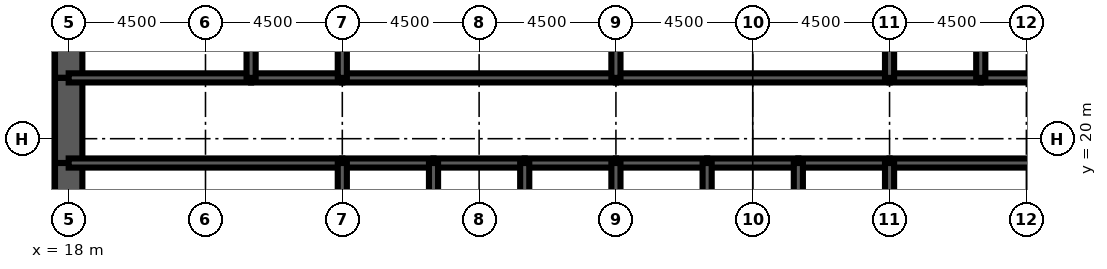
"""IFC4 building model, lengths in metres.
Left out: names, types, materials, properties, quantities, classifications, styles, units other than length and angle.
Written with IfcOpenShell. Run it as: python <this file> out.ifc"""

import sys

from ifc_helpers import new_model, si_unit, direction, frame, frame_2d, origin, place, context, subcontext, project, spatial, rectangle, extrude, element, fill, save


model = new_model("IFC4")
c1 = context("Model", 3, precision=1e-05, world=origin(), true_north=direction((0.0, 1.0)))
c2 = subcontext(c1, "Body", "Model", "MODEL_VIEW")
j1 = project(units=[si_unit("LENGTHUNIT", "METRE"), si_unit("PLANEANGLEUNIT", "RADIAN")], contexts=[c1])
p1 = place(None, origin())
s1 = spatial("IfcSite", under=j1, at=p1, CompositionType="ELEMENT")
p2 = place(p1, origin())
s2 = spatial("IfcBuilding", under=s1, at=p2, CompositionType="ELEMENT")
p3 = place(p2, frame((0.0, 0.0, 163.5)))
s3 = spatial("IfcBuildingStorey", under=s2, at=p3, CompositionType="ELEMENT", Elevation=163.5)
p4 = place(p3, frame((18.0, 26.0, 0.0), z_axis=(0.0, 0.0, 1.0), x_axis=(0.0, -1.0, 0.0)))
e1 = element("IfcWall", 1, at=p4, inside=s3, PredefinedType="SHEAR", context=c2, shape_type="SweptSolid", body=[
    extrude(rectangle(XDim=4.0, YDim=0.9, at=frame_2d((2.0, 0.0))), origin(), (0.0, 0.0, 1.0), 4.2),
])
p5 = place(p3, frame((18.0, 22.0, 0.0), z_axis=(0.0, 0.0, 1.0), x_axis=(0.0, -1.0, 0.0)))
e2 = element("IfcWall", 2, at=p5, inside=s3, PredefinedType="SHEAR", context=c2, shape_type="SweptSolid", body=[
    extrude(rectangle(XDim=2.8, YDim=0.9, at=frame_2d((1.4, 0.0))), origin(), (0.0, 0.0, 1.0), 4.2),
])
p6 = place(p5, frame((0.6, 0.0, 0.0)))
e3 = element("IfcOpeningElement", 3, at=p6, cuts=e2, PredefinedType="OPENING", context=c2, shape_type="SweptSolid", body=[
    extrude(rectangle(XDim=1.8, YDim=2.1, at=frame_2d((0.9, 1.05))), frame((0.0, 0.46, 0.0), z_axis=(0.0, -1.0, 0.0), x_axis=(1.0, 0.0, 0.0)), (0.0, 0.0, 1.0), 0.92),
])
p7 = place(p3, frame((18.0, 19.2, 0.0), z_axis=(0.0, 0.0, 1.0), x_axis=(0.0, -1.0, 0.0)))
e4 = element("IfcWall", 4, at=p7, inside=s3, PredefinedType="SHEAR", context=c2, shape_type="SweptSolid", body=[
    extrude(rectangle(XDim=3.2, YDim=0.9, at=frame_2d((1.6, 0.0))), origin(), (0.0, 0.0, 1.0), 4.2),
])
p8 = place(p3, frame((18.0, 19.2, 0.0), z_axis=(0.0, 0.0, 1.0), x_axis=(1.0, 0.0, 0.0)))
e5 = element("IfcWall", 5, at=p8, inside=s3, PredefinedType="SOLIDWALL", context=c2, shape_type="SweptSolid", body=[
    extrude(rectangle(XDim=9.0, YDim=0.3, at=frame_2d((4.5, 0.0))), origin(), (0.0, 0.0, 1.0), 4.2),
])
p9 = place(p8, frame((0.65, 0.0, 0.0)))
e6 = element("IfcOpeningElement", 6, at=p9, cuts=e5, PredefinedType="OPENING", context=c2, shape_type="SweptSolid", body=[
    extrude(rectangle(XDim=1.0, YDim=2.1, at=frame_2d((0.5, 1.05))), frame((0.0, 0.16, 0.0), z_axis=(0.0, -1.0, 0.0), x_axis=(1.0, 0.0, 0.0)), (0.0, 0.0, 1.0), 0.32),
])
p10 = place(p3, frame((27.0, 19.2, 0.0), z_axis=(0.0, 0.0, 1.0), x_axis=(1.0, 0.0, 0.0)))
e7 = element("IfcWall", 7, at=p10, inside=s3, PredefinedType="SOLIDWALL", context=c2, shape_type="SweptSolid", body=[
    extrude(rectangle(XDim=3.0, YDim=0.3, at=frame_2d((1.5, 0.0))), origin(), (0.0, 0.0, 1.0), 4.2),
])
p11 = place(p10, frame((0.95, 0.0, 0.0)))
e8 = element("IfcOpeningElement", 8, at=p11, cuts=e7, PredefinedType="OPENING", context=c2, shape_type="SweptSolid", body=[
    extrude(rectangle(XDim=1.1, YDim=2.2, at=frame_2d((0.55, 1.1))), frame((0.0, 0.16, 0.0), z_axis=(0.0, -1.0, 0.0), x_axis=(1.0, 0.0, 0.0)), (0.0, 0.0, 1.0), 0.32),
])
p12 = place(p3, frame((30.0, 19.2, 0.0), z_axis=(0.0, 0.0, 1.0), x_axis=(1.0, 0.0, 0.0)))
e9 = element("IfcWall", 9, at=p12, inside=s3, PredefinedType="SOLIDWALL", context=c2, shape_type="SweptSolid", body=[
    extrude(rectangle(XDim=3.0, YDim=0.3, at=frame_2d((1.5, 0.0))), origin(), (0.0, 0.0, 1.0), 4.2),
])
p13 = place(p12, frame((0.95, 0.0, 0.0)))
e10 = element("IfcOpeningElement", 10, at=p13, cuts=e9, PredefinedType="OPENING", context=c2, shape_type="SweptSolid", body=[
    extrude(rectangle(XDim=1.1, YDim=2.2, at=frame_2d((0.55, 1.1))), frame((0.0, 0.16, 0.0), z_axis=(0.0, -1.0, 0.0), x_axis=(1.0, 0.0, 0.0)), (0.0, 0.0, 1.0), 0.32),
])
p14 = place(p3, frame((33.0, 19.2, 0.0), z_axis=(0.0, 0.0, 1.0), x_axis=(1.0, 0.0, 0.0)))
e11 = element("IfcWall", 11, at=p14, inside=s3, PredefinedType="SOLIDWALL", context=c2, shape_type="SweptSolid", body=[
    extrude(rectangle(XDim=3.0, YDim=0.3, at=frame_2d((1.5, 0.0))), origin(), (0.0, 0.0, 1.0), 4.2),
])
p15 = place(p14, frame((0.95, 0.0, 0.0)))
e12 = element("IfcOpeningElement", 12, at=p15, cuts=e11, PredefinedType="OPENING", context=c2, shape_type="SweptSolid", body=[
    extrude(rectangle(XDim=1.1, YDim=2.2, at=frame_2d((0.55, 1.1))), frame((0.0, 0.16, 0.0), z_axis=(0.0, -1.0, 0.0), x_axis=(1.0, 0.0, 0.0)), (0.0, 0.0, 1.0), 0.32),
])
p16 = place(p3, frame((36.0, 19.2, 0.0), z_axis=(0.0, 0.0, 1.0), x_axis=(1.0, 0.0, 0.0)))
e13 = element("IfcWall", 13, at=p16, inside=s3, PredefinedType="SOLIDWALL", context=c2, shape_type="SweptSolid", body=[
    extrude(rectangle(XDim=3.0, YDim=0.3, at=frame_2d((1.5, 0.0))), origin(), (0.0, 0.0, 1.0), 4.2),
])
p17 = place(p16, frame((0.95, 0.0, 0.0)))
e14 = element("IfcOpeningElement", 14, at=p17, cuts=e13, PredefinedType="OPENING", context=c2, shape_type="SweptSolid", body=[
    extrude(rectangle(XDim=1.1, YDim=2.2, at=frame_2d((0.55, 1.1))), frame((0.0, 0.16, 0.0), z_axis=(0.0, -1.0, 0.0), x_axis=(1.0, 0.0, 0.0)), (0.0, 0.0, 1.0), 0.32),
])
p18 = place(p3, frame((39.0, 19.2, 0.0), z_axis=(0.0, 0.0, 1.0), x_axis=(1.0, 0.0, 0.0)))
e15 = element("IfcWall", 15, at=p18, inside=s3, PredefinedType="SOLIDWALL", context=c2, shape_type="SweptSolid", body=[
    extrude(rectangle(XDim=3.0, YDim=0.3, at=frame_2d((1.5, 0.0))), origin(), (0.0, 0.0, 1.0), 4.2),
])
p19 = place(p18, frame((1.0, 0.0, 0.0)))
e16 = element("IfcOpeningElement", 16, at=p19, cuts=e15, PredefinedType="OPENING", context=c2, shape_type="SweptSolid", body=[
    extrude(rectangle(XDim=1.0, YDim=2.1, at=frame_2d((0.5, 1.05))), frame((0.0, 0.16, 0.0), z_axis=(0.0, -1.0, 0.0), x_axis=(1.0, 0.0, 0.0)), (0.0, 0.0, 1.0), 0.32),
])
p20 = place(p3, frame((42.0, 19.2, 0.0), z_axis=(0.0, 0.0, 1.0), x_axis=(1.0, 0.0, 0.0)))
e17 = element("IfcWall", 17, at=p20, inside=s3, PredefinedType="SOLIDWALL", context=c2, shape_type="SweptSolid", body=[
    extrude(rectangle(XDim=3.0, YDim=0.3, at=frame_2d((1.5, 0.0))), origin(), (0.0, 0.0, 1.0), 4.2),
])
p21 = place(p3, frame((45.0, 19.2, 0.0), z_axis=(0.0, 0.0, 1.0), x_axis=(1.0, 0.0, 0.0)))
e18 = element("IfcWall", 18, at=p21, inside=s3, PredefinedType="SOLIDWALL", context=c2, shape_type="SweptSolid", body=[
    extrude(rectangle(XDim=9.0, YDim=0.3, at=frame_2d((4.5, 0.0))), origin(), (0.0, 0.0, 1.0), 4.2),
])
p22 = place(p21, frame((7.35, 0.0, 0.0)))
e19 = element("IfcOpeningElement", 19, at=p22, cuts=e18, PredefinedType="OPENING", context=c2, shape_type="SweptSolid", body=[
    extrude(rectangle(XDim=1.0, YDim=2.1, at=frame_2d((0.5, 1.05))), frame((0.0, 0.16, 0.0), z_axis=(0.0, -1.0, 0.0), x_axis=(1.0, 0.0, 0.0)), (0.0, 0.0, 1.0), 0.32),
])
p23 = place(p3, frame((18.0, 22.0, 0.0), z_axis=(0.0, 0.0, 1.0), x_axis=(1.0, 0.0, 0.0)))
e20 = element("IfcWall", 20, at=p23, inside=s3, PredefinedType="SOLIDWALL", context=c2, shape_type="SweptSolid", body=[
    extrude(rectangle(XDim=6.0, YDim=0.3, at=frame_2d((3.0, 0.0))), origin(), (0.0, 0.0, 1.0), 4.2),
])
p24 = place(p23, frame((4.4, 0.0, 0.0)))
e21 = element("IfcOpeningElement", 21, at=p24, cuts=e20, PredefinedType="OPENING", context=c2, shape_type="SweptSolid", body=[
    extrude(rectangle(XDim=1.0, YDim=2.1, at=frame_2d((0.5, 1.05))), frame((0.0, 0.16, 0.0), z_axis=(0.0, -1.0, 0.0), x_axis=(1.0, 0.0, 0.0)), (0.0, 0.0, 1.0), 0.32),
])
p25 = place(p23, frame((0.85, 0.0, 0.0)))
e22 = element("IfcOpeningElement", 22, at=p25, cuts=e20, PredefinedType="OPENING", context=c2, shape_type="SweptSolid", body=[
    extrude(rectangle(XDim=1.0, YDim=2.1, at=frame_2d((0.5, 1.05))), frame((0.0, 0.16, 0.0), z_axis=(0.0, -1.0, 0.0), x_axis=(1.0, 0.0, 0.0)), (0.0, 0.0, 1.0), 0.32),
])
p26 = place(p3, frame((24.0, 22.0, 0.0), z_axis=(0.0, 0.0, 1.0), x_axis=(1.0, 0.0, 0.0)))
e23 = element("IfcWall", 23, at=p26, inside=s3, PredefinedType="SOLIDWALL", context=c2, shape_type="SweptSolid", body=[
    extrude(rectangle(XDim=3.0, YDim=0.3, at=frame_2d((1.5, 0.0))), origin(), (0.0, 0.0, 1.0), 4.2),
])
p27 = place(p26, frame((1.0, 0.0, 0.0)))
e24 = element("IfcOpeningElement", 24, at=p27, cuts=e23, PredefinedType="OPENING", context=c2, shape_type="SweptSolid", body=[
    extrude(rectangle(XDim=1.0, YDim=2.1, at=frame_2d((0.5, 1.05))), frame((0.0, 0.16, 0.0), z_axis=(0.0, -1.0, 0.0), x_axis=(1.0, 0.0, 0.0)), (0.0, 0.0, 1.0), 0.32),
])
p28 = place(p3, frame((27.0, 22.0, 0.0), z_axis=(0.0, 0.0, 1.0), x_axis=(1.0, 0.0, 0.0)))
e25 = element("IfcWall", 25, at=p28, inside=s3, PredefinedType="SOLIDWALL", context=c2, shape_type="SweptSolid", body=[
    extrude(rectangle(XDim=9.0, YDim=0.3, at=frame_2d((4.5, 0.0))), origin(), (0.0, 0.0, 1.0), 4.2),
])
p29 = place(p28, frame((4.0, 0.0, 0.0)))
e26 = element("IfcOpeningElement", 26, at=p29, cuts=e25, PredefinedType="OPENING", context=c2, shape_type="SweptSolid", body=[
    extrude(rectangle(XDim=1.0, YDim=2.1, at=frame_2d((0.5, 1.05))), frame((0.0, 0.16, 0.0), z_axis=(0.0, -1.0, 0.0), x_axis=(1.0, 0.0, 0.0)), (0.0, 0.0, 1.0), 0.32),
])
p30 = place(p3, frame((36.0, 22.0, 0.0), z_axis=(0.0, 0.0, 1.0), x_axis=(1.0, 0.0, 0.0)))
e27 = element("IfcWall", 27, at=p30, inside=s3, PredefinedType="SOLIDWALL", context=c2, shape_type="SweptSolid", body=[
    extrude(rectangle(XDim=9.0, YDim=0.3, at=frame_2d((4.5, 0.0))), origin(), (0.0, 0.0, 1.0), 4.2),
])
p31 = place(p30, frame((4.0, 0.0, 0.0)))
e28 = element("IfcOpeningElement", 28, at=p31, cuts=e27, PredefinedType="OPENING", context=c2, shape_type="SweptSolid", body=[
    extrude(rectangle(XDim=1.0, YDim=2.1, at=frame_2d((0.5, 1.05))), frame((0.0, 0.16, 0.0), z_axis=(0.0, -1.0, 0.0), x_axis=(1.0, 0.0, 0.0)), (0.0, 0.0, 1.0), 0.32),
])
p32 = place(p3, frame((45.0, 22.0, 0.0), z_axis=(0.0, 0.0, 1.0), x_axis=(1.0, 0.0, 0.0)))
e29 = element("IfcWall", 29, at=p32, inside=s3, PredefinedType="SOLIDWALL", context=c2, shape_type="SweptSolid", body=[
    extrude(rectangle(XDim=3.0, YDim=0.3, at=frame_2d((1.5, 0.0))), origin(), (0.0, 0.0, 1.0), 4.2),
])
p33 = place(p32, frame((1.0, 0.0, 0.0)))
e30 = element("IfcOpeningElement", 30, at=p33, cuts=e29, PredefinedType="OPENING", context=c2, shape_type="SweptSolid", body=[
    extrude(rectangle(XDim=1.0, YDim=2.1, at=frame_2d((0.5, 1.05))), frame((0.0, 0.16, 0.0), z_axis=(0.0, -1.0, 0.0), x_axis=(1.0, 0.0, 0.0)), (0.0, 0.0, 1.0), 0.32),
])
p34 = place(p3, frame((48.0, 22.0, 0.0), z_axis=(0.0, 0.0, 1.0), x_axis=(1.0, 0.0, 0.0)))
e31 = element("IfcWall", 31, at=p34, inside=s3, PredefinedType="SOLIDWALL", context=c2, shape_type="SweptSolid", body=[
    extrude(rectangle(XDim=6.0, YDim=0.3, at=frame_2d((3.0, 0.0))), origin(), (0.0, 0.0, 1.0), 4.2),
])
p35 = place(p34, frame((2.0, 0.0, 0.0)))
e32 = element("IfcOpeningElement", 32, at=p35, cuts=e31, PredefinedType="OPENING", context=c2, shape_type="SweptSolid", body=[
    extrude(rectangle(XDim=1.0, YDim=2.1, at=frame_2d((0.5, 1.05))), frame((0.0, 0.16, 0.0), z_axis=(0.0, -1.0, 0.0), x_axis=(1.0, 0.0, 0.0)), (0.0, 0.0, 1.0), 0.32),
])
p36 = place(p34, frame((4.3, 0.0, 0.0)))
e33 = element("IfcOpeningElement", 33, at=p36, cuts=e31, PredefinedType="OPENING", context=c2, shape_type="SweptSolid", body=[
    extrude(rectangle(XDim=1.0, YDim=2.1, at=frame_2d((0.5, 1.05))), frame((0.0, 0.16, 0.0), z_axis=(0.0, -1.0, 0.0), x_axis=(1.0, 0.0, 0.0)), (0.0, 0.0, 1.0), 0.32),
])
for number, where, z_axis, x_axis in (
    (34, (27.0, 16.0, 0.0), (0.0, 0.0, 1.0), (0.0, 1.0, 0.0)),
    (35, (30.0, 16.0, 0.0), (0.0, 0.0, 1.0), (0.0, 1.0, 0.0)),
    (36, (33.0, 16.0, 0.0), (0.0, 0.0, 1.0), (0.0, 1.0, 0.0)),
    (37, (36.0, 16.0, 0.0), (0.0, 0.0, 1.0), (0.0, 1.0, 0.0)),
    (38, (39.0, 16.0, 0.0), (0.0, 0.0, 1.0), (0.0, 1.0, 0.0)),
    (39, (42.0, 16.0, 0.0), (0.0, 0.0, 1.0), (0.0, 1.0, 0.0)),
    (40, (45.0, 16.0, 0.0), (0.0, 0.0, 1.0), (0.0, 1.0, 0.0)),
):
    element("IfcWall", number, at=place(p3, frame(where, z_axis=z_axis, x_axis=x_axis)), inside=s3, PredefinedType="SOLIDWALL", context=c2, shape_type="SweptSolid", body=[
        extrude(rectangle(XDim=3.2, YDim=0.3, at=frame_2d((1.6, 0.0))), origin(), (0.0, 0.0, 1.0), 4.2),
    ])
for number, where, z_axis, x_axis in (
    (41, (24.0, 22.0, 0.0), (0.0, 0.0, 1.0), (0.0, 1.0, 0.0)),
    (42, (27.0, 22.0, 0.0), (0.0, 0.0, 1.0), (0.0, 1.0, 0.0)),
    (43, (36.0, 22.0, 0.0), (0.0, 0.0, 1.0), (0.0, 1.0, 0.0)),
    (44, (45.0, 22.0, 0.0), (0.0, 0.0, 1.0), (0.0, 1.0, 0.0)),
    (45, (48.0, 22.0, 0.0), (0.0, 0.0, 1.0), (0.0, 1.0, 0.0)),
):
    element("IfcWall", number, at=place(p3, frame(where, z_axis=z_axis, x_axis=x_axis)), inside=s3, PredefinedType="SOLIDWALL", context=c2, shape_type="SweptSolid", body=[
        extrude(rectangle(XDim=4.0, YDim=0.3, at=frame_2d((2.0, 0.0))), origin(), (0.0, 0.0, 1.0), 4.2),
    ])
p37 = place(p3, frame((39.0, 22.15, 0.0), z_axis=(0.0, 0.0, 1.0), x_axis=(0.0, 1.0, 0.0)))
e46 = element("IfcWall", 46, at=p37, inside=s3, PredefinedType="PARTITIONING", context=c2, shape_type="SweptSolid", body=[
    extrude(rectangle(XDim=3.7, YDim=0.15, at=frame_2d((1.85, 0.0))), origin(), (0.0, 0.0, 1.0), 3.0),
])
p38 = place(p37, frame((2.2, 0.0, 0.0)))
e47 = element("IfcOpeningElement", 47, at=p38, cuts=e46, PredefinedType="OPENING", context=c2, shape_type="SweptSolid", body=[
    extrude(rectangle(XDim=1.0, YDim=2.1, at=frame_2d((0.5, 1.05))), frame((0.0, 0.085, 0.0), z_axis=(0.0, -1.0, 0.0), x_axis=(1.0, 0.0, 0.0)), (0.0, 0.0, 1.0), 0.17),
])
p39 = place(p3, frame((20.325, 22.15, 0.0), z_axis=(0.0, 0.0, 1.0), x_axis=(0.0, 1.0, 0.0)))
e48 = element("IfcWall", 48, at=p39, inside=s3, PredefinedType="PARTITIONING", context=c2, shape_type="SweptSolid", body=[
    extrude(rectangle(XDim=3.7, YDim=0.15, at=frame_2d((1.85, 0.0))), origin(), (0.0, 0.0, 1.0), 3.0),
])
p40 = place(p3, frame((48.6, 19.35, 0.0), z_axis=(0.0, 0.0, 1.0), x_axis=(0.0, 1.0, 0.0)))
e49 = element("IfcWall", 49, at=p40, inside=s3, PredefinedType="PARTITIONING", context=c2, shape_type="SweptSolid", body=[
    extrude(rectangle(XDim=2.5, YDim=0.15, at=frame_2d((1.25, 0.0))), origin(), (0.0, 0.0, 1.0), 3.0),
])
p41 = place(p40, frame((1.15, 0.0, 0.0)))
e50 = element("IfcOpeningElement", 50, at=p41, cuts=e49, PredefinedType="OPENING", context=c2, shape_type="SweptSolid", body=[
    extrude(rectangle(XDim=1.0, YDim=2.1, at=frame_2d((0.5, 1.05))), frame((0.0, 0.085, 0.0), z_axis=(0.0, -1.0, 0.0), x_axis=(1.0, 0.0, 0.0)), (0.0, 0.0, 1.0), 0.17),
])
p42 = place(p41, origin())
e51 = element("IfcDoor", 51, at=p42, inside=s3, OperationType="SINGLE_SWING_RIGHT", PredefinedType="DOOR", context=c2, shape_type="SweptSolid", body=[
    extrude(rectangle(XDim=1.0, YDim=2.1, at=frame_2d((0.5, 1.05))), frame((0.0, 0.025, 0.0), z_axis=(0.0, -1.0, 0.0), x_axis=(1.0, 0.0, 0.0)), (0.0, 0.0, 1.0), 0.05),
])
fill(e50, e51)
p43 = place(p11, origin())
e52 = element("IfcDoor", 52, at=p43, inside=s3, OperationType="DOUBLE_DOOR_SLIDING", PredefinedType="USERDEFINED", context=c2, shape_type="SweptSolid", body=[
    extrude(rectangle(XDim=1.1, YDim=2.2, at=frame_2d((0.55, 1.1))), frame((0.0, 0.025, 0.0), z_axis=(0.0, -1.0, 0.0), x_axis=(1.0, 0.0, 0.0)), (0.0, 0.0, 1.0), 0.05),
])
fill(e8, e52)
p44 = place(p13, origin())
e53 = element("IfcDoor", 53, at=p44, inside=s3, OperationType="DOUBLE_DOOR_SLIDING", PredefinedType="USERDEFINED", context=c2, shape_type="SweptSolid", body=[
    extrude(rectangle(XDim=1.1, YDim=2.2, at=frame_2d((0.55, 1.1))), frame((0.0, 0.025, 0.0), z_axis=(0.0, -1.0, 0.0), x_axis=(1.0, 0.0, 0.0)), (0.0, 0.0, 1.0), 0.05),
])
fill(e10, e53)
p45 = place(p15, origin())
e54 = element("IfcDoor", 54, at=p45, inside=s3, OperationType="DOUBLE_DOOR_SLIDING", PredefinedType="USERDEFINED", context=c2, shape_type="SweptSolid", body=[
    extrude(rectangle(XDim=1.1, YDim=2.2, at=frame_2d((0.55, 1.1))), frame((0.0, 0.025, 0.0), z_axis=(0.0, -1.0, 0.0), x_axis=(1.0, 0.0, 0.0)), (0.0, 0.0, 1.0), 0.05),
])
fill(e12, e54)
p46 = place(p17, origin())
e55 = element("IfcDoor", 55, at=p46, inside=s3, OperationType="DOUBLE_DOOR_SLIDING", PredefinedType="USERDEFINED", context=c2, shape_type="SweptSolid", body=[
    extrude(rectangle(XDim=1.1, YDim=2.2, at=frame_2d((0.55, 1.1))), frame((0.0, 0.025, 0.0), z_axis=(0.0, -1.0, 0.0), x_axis=(1.0, 0.0, 0.0)), (0.0, 0.0, 1.0), 0.05),
])
fill(e14, e55)
p47 = place(p9, origin())
e56 = element("IfcDoor", 56, at=p47, inside=s3, OperationType="SINGLE_SWING_LEFT", PredefinedType="DOOR", context=c2, shape_type="SweptSolid", body=[
    extrude(rectangle(XDim=1.0, YDim=2.1, at=frame_2d((0.5, 1.05))), frame((0.0, 0.025, 0.0), z_axis=(0.0, -1.0, 0.0), x_axis=(1.0, 0.0, 0.0)), (0.0, 0.0, 1.0), 0.05),
])
fill(e6, e56)
p48 = place(p6, origin())
e57 = element("IfcDoor", 57, at=p48, inside=s3, OperationType="SINGLE_SWING_LEFT", PredefinedType="DOOR", context=c2, shape_type="SweptSolid", body=[
    extrude(rectangle(XDim=1.8, YDim=2.1, at=frame_2d((0.9, 1.05))), frame((0.0, 0.45, 0.0), z_axis=(0.0, -1.0, 0.0), x_axis=(1.0, 0.0, 0.0)), (0.0, 0.0, 1.0), 0.899),
])
fill(e3, e57)
p49 = place(p24, origin())
e58 = element("IfcDoor", 58, at=p49, inside=s3, OperationType="SINGLE_SWING_RIGHT", PredefinedType="DOOR", context=c2, shape_type="SweptSolid", body=[
    extrude(rectangle(XDim=1.0, YDim=2.1, at=frame_2d((0.5, 1.05))), frame((0.0, 0.025, 0.0), z_axis=(0.0, -1.0, 0.0), x_axis=(1.0, 0.0, 0.0)), (0.0, 0.0, 1.0), 0.05),
])
fill(e21, e58)
p50 = place(p27, origin())
e59 = element("IfcDoor", 59, at=p50, inside=s3, OperationType="SINGLE_SWING_LEFT", PredefinedType="DOOR", context=c2, shape_type="SweptSolid", body=[
    extrude(rectangle(XDim=1.0, YDim=2.1, at=frame_2d((0.5, 1.05))), frame((0.0, 0.025, 0.0), z_axis=(0.0, -1.0, 0.0), x_axis=(1.0, 0.0, 0.0)), (0.0, 0.0, 1.0), 0.05),
])
fill(e24, e59)
p51 = place(p29, origin())
e60 = element("IfcDoor", 60, at=p51, inside=s3, OperationType="SINGLE_SWING_LEFT", PredefinedType="DOOR", context=c2, shape_type="SweptSolid", body=[
    extrude(rectangle(XDim=1.0, YDim=2.1, at=frame_2d((0.5, 1.05))), frame((0.0, 0.025, 0.0), z_axis=(0.0, -1.0, 0.0), x_axis=(1.0, 0.0, 0.0)), (0.0, 0.0, 1.0), 0.05),
])
fill(e26, e60)
p52 = place(p31, origin())
e61 = element("IfcDoor", 61, at=p52, inside=s3, OperationType="SINGLE_SWING_LEFT", PredefinedType="DOOR", context=c2, shape_type="SweptSolid", body=[
    extrude(rectangle(XDim=1.0, YDim=2.1, at=frame_2d((0.5, 1.05))), frame((0.0, 0.025, 0.0), z_axis=(0.0, -1.0, 0.0), x_axis=(1.0, 0.0, 0.0)), (0.0, 0.0, 1.0), 0.05),
])
fill(e28, e61)
p53 = place(p33, origin())
e62 = element("IfcDoor", 62, at=p53, inside=s3, OperationType="SINGLE_SWING_LEFT", PredefinedType="DOOR", context=c2, shape_type="SweptSolid", body=[
    extrude(rectangle(XDim=1.0, YDim=2.1, at=frame_2d((0.5, 1.05))), frame((0.0, 0.025, 0.0), z_axis=(0.0, -1.0, 0.0), x_axis=(1.0, 0.0, 0.0)), (0.0, 0.0, 1.0), 0.05),
])
fill(e30, e62)
p54 = place(p25, origin())
e63 = element("IfcDoor", 63, at=p54, inside=s3, OperationType="SINGLE_SWING_LEFT", PredefinedType="DOOR", context=c2, shape_type="SweptSolid", body=[
    extrude(rectangle(XDim=1.0, YDim=2.1, at=frame_2d((0.5, 1.05))), frame((0.0, 0.025, 0.0), z_axis=(0.0, -1.0, 0.0), x_axis=(1.0, 0.0, 0.0)), (0.0, 0.0, 1.0), 0.05),
])
fill(e22, e63)
p55 = place(p19, origin())
e64 = element("IfcDoor", 64, at=p55, inside=s3, OperationType="SINGLE_SWING_LEFT", PredefinedType="DOOR", context=c2, shape_type="SweptSolid", body=[
    extrude(rectangle(XDim=1.0, YDim=2.1, at=frame_2d((0.5, 1.05))), frame((0.0, 0.025, 0.0), z_axis=(0.0, -1.0, 0.0), x_axis=(1.0, 0.0, 0.0)), (0.0, 0.0, 1.0), 0.05),
])
fill(e16, e64)
save(model, sys.argv[1])
